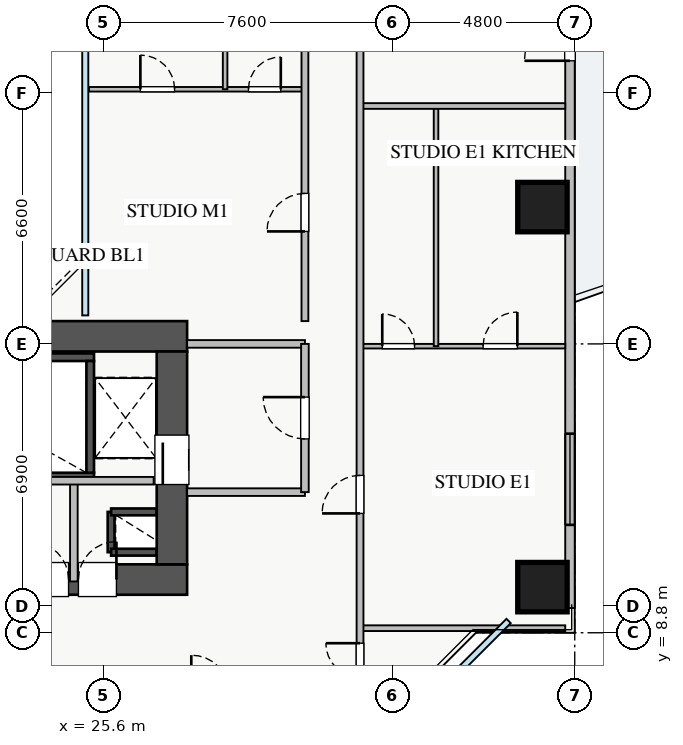
"""IFC4 building model, lengths in metres.
Left out: names, types, materials, properties, quantities, classifications, styles, units other than length and angle.
Written with IfcOpenShell. Run it as: python <this file> out.ifc"""

import sys

from ifc_helpers import new_model, si_unit, direction, frame, frame_2d, origin, origin_2d, place, context, subcontext, project, spatial, rectangle, extrude, source, transform, mapped, element, fill, save


model = new_model("IFC4")
c1 = context("Model", 3, precision=1e-05, world=origin(), true_north=direction((0.0, 1.0)))
c2 = subcontext(c1, "Body", "Model", "MODEL_VIEW")
j1 = project(units=[si_unit("LENGTHUNIT", "METRE"), si_unit("PLANEANGLEUNIT", "RADIAN")], contexts=[c1])
p1 = place(None, origin())
s1 = spatial("IfcSite", under=j1, at=p1, CompositionType="ELEMENT")
p2 = place(p1, origin())
s2 = spatial("IfcBuilding", under=s1, at=p2, CompositionType="ELEMENT")
p3 = place(p2, frame((0.0, 0.0, 86.0)))
s3 = spatial("IfcBuildingStorey", under=s2, at=p3, CompositionType="ELEMENT", Elevation=86.0)
p4 = place(p3, frame((25.8, 10.92, 0.0), z_axis=(0.0, 0.0, 1.0), x_axis=(0.0, 1.0, 0.0)))
e1 = element("IfcWall", 1, at=p4, inside=s3, PredefinedType="SHEAR", context=c2, shape_type="SweptSolid", body=[
    extrude(rectangle(XDim=1.06, YDim=0.18, at=frame_2d((0.53, 0.0))), origin(), (0.0, 0.0, 1.0), 3.07),
])
for number, where, z_axis, x_axis in (
    (2, (25.8, 11.98, 0.0), (0.0, 0.0, 1.0), (1.0, 0.0, 0.0)),
    (3, (25.8, 10.92, 0.0), (0.0, 0.0, 1.0), (1.0, 0.0, 0.0)),
):
    element("IfcWall", number, at=place(p3, frame(where, z_axis=z_axis, x_axis=x_axis)), inside=s3, PredefinedType="SHEAR", context=c2, shape_type="SweptSolid", body=[
        extrude(rectangle(XDim=1.2, YDim=0.18, at=frame_2d((0.6, 0.0))), origin(), (0.0, 0.0, 1.0), 3.07),
    ])
p5 = place(p3, frame((18.2, 12.91, 0.0), z_axis=(0.0, 0.0, 1.0), x_axis=(1.0, 0.0, 0.0)))
e4 = element("IfcWall", 4, at=p5, inside=s3, PredefinedType="SHEAR", context=c2, shape_type="SweptSolid", body=[
    extrude(rectangle(XDim=7.15, YDim=0.2, at=frame_2d((3.575, 0.0))), origin(), (0.0, 0.0, 1.0), 3.25),
])
p6 = place(p5, frame((0.35, 0.0, 0.0)))
e5 = element("IfcOpeningElement", 5, at=p6, cuts=e4, PredefinedType="OPENING", context=c2, shape_type="SweptSolid", body=[
    extrude(rectangle(XDim=1.1, YDim=2.05, at=frame_2d((0.55, 1.025))), frame((0.0, 0.11, 0.0), z_axis=(0.0, -1.0, 0.0), x_axis=(1.0, 0.0, 0.0)), (0.0, 0.0, 1.0), 0.22),
])
p7 = place(p3, frame((18.2, 16.05, 0.0), z_axis=(0.0, 0.0, 1.0), x_axis=(1.0, 0.0, 0.0)))
e6 = element("IfcWall", 6, at=p7, inside=s3, PredefinedType="SHEAR", context=c2, shape_type="SweptSolid", body=[
    extrude(rectangle(XDim=7.15, YDim=0.2, at=frame_2d((3.575, 0.0))), origin(), (0.0, 0.0, 1.0), 3.25),
])
p8 = place(p3, frame((25.25, 13.01, 0.0), z_axis=(0.0, 0.0, 1.0), x_axis=(0.0, 1.0, 0.0)))
e7 = element("IfcWall", 7, at=p8, inside=s3, PredefinedType="SHEAR", context=c2, shape_type="SweptSolid", body=[
    extrude(rectangle(XDim=2.94, YDim=0.2, at=frame_2d((1.47, 0.0))), origin(), (0.0, 0.0, 1.0), 3.25),
])
p9 = place(p3, frame((10.2, 10.2, 0.0), z_axis=(0.0, 0.0, 1.0), x_axis=(1.0, 0.0, 0.0)))
e8 = element("IfcWall", 8, at=p9, inside=s3, PredefinedType="SHEAR", context=c2, shape_type="SweptSolid", body=[
    extrude(rectangle(XDim=17.6, YDim=0.8, at=frame_2d((8.8, 0.0))), origin(), (0.0, 0.0, 1.0), 3.25),
])
p10 = place(p9, frame((1.15, 0.0, 0.0)))
e9 = element("IfcOpeningElement", 9, at=p10, cuts=e8, PredefinedType="OPENING", context=c2, shape_type="SweptSolid", body=[
    extrude(rectangle(XDim=1.1, YDim=2.05, at=frame_2d((0.55, 1.025))), frame((0.0, 0.41, 0.0), z_axis=(0.0, -1.0, 0.0), x_axis=(1.0, 0.0, 0.0)), (0.0, 0.0, 1.0), 0.82),
])
p11 = place(p9, frame((8.3, 0.0, 0.0)))
e10 = element("IfcOpeningElement", 10, at=p11, cuts=e8, PredefinedType="OPENING", context=c2, shape_type="SweptSolid", body=[
    extrude(rectangle(XDim=1.1, YDim=2.05, at=frame_2d((0.55, 1.025))), frame((0.0, 0.41, 0.0), z_axis=(0.0, -1.0, 0.0), x_axis=(1.0, 0.0, 0.0)), (0.0, 0.0, 1.0), 0.82),
])
p12 = place(p9, frame((10.05, 0.0, 0.0)))
e11 = element("IfcOpeningElement", 11, at=p12, cuts=e8, PredefinedType="OPENING", context=c2, shape_type="SweptSolid", body=[
    extrude(rectangle(XDim=1.1, YDim=2.05, at=frame_2d((0.55, 1.025))), frame((0.0, 0.41, 0.0), z_axis=(0.0, -1.0, 0.0), x_axis=(1.0, 0.0, 0.0)), (0.0, 0.0, 1.0), 0.82),
])
p13 = place(p9, frame((14.74, 0.0, 0.0)))
e12 = element("IfcOpeningElement", 12, at=p13, cuts=e8, PredefinedType="OPENING", context=c2, shape_type="SweptSolid", body=[
    extrude(rectangle(XDim=1.0, YDim=2.05, at=frame_2d((0.5, 1.025))), frame((0.0, 0.41, 0.0), z_axis=(0.0, -1.0, 0.0), x_axis=(1.0, 0.0, 0.0)), (0.0, 0.0, 1.0), 0.82),
])
p14 = place(p9, frame((11.945, 0.0, 0.0)))
e13 = element("IfcOpeningElement", 13, at=p14, cuts=e8, PredefinedType="OPENING", context=c2, shape_type="SweptSolid", body=[
    extrude(rectangle(XDim=1.0, YDim=2.05, at=frame_2d((0.5, 1.025))), frame((0.0, 0.41, 0.0), z_axis=(0.0, -1.0, 0.0), x_axis=(1.0, 0.0, 0.0)), (0.0, 0.0, 1.0), 0.82),
])
p15 = place(p9, frame((13.48, 0.0, 0.0)))
e14 = element("IfcOpeningElement", 14, at=p15, cuts=e8, PredefinedType="OPENING", context=c2, shape_type="SweptSolid", body=[
    extrude(rectangle(XDim=1.0, YDim=2.05, at=frame_2d((0.5, 1.025))), frame((0.0, 0.41, 0.0), z_axis=(0.0, -1.0, 0.0), x_axis=(1.0, 0.0, 0.0)), (0.0, 0.0, 1.0), 0.82),
])
p16 = place(p3, frame((10.2, 16.6, 0.0), z_axis=(0.0, 0.0, 1.0), x_axis=(1.0, 0.0, 0.0)))
e15 = element("IfcWall", 15, at=p16, inside=s3, PredefinedType="SHEAR", context=c2, shape_type="SweptSolid", body=[
    extrude(rectangle(XDim=17.6, YDim=0.8, at=frame_2d((8.8, 0.0))), origin(), (0.0, 0.0, 1.0), 3.25),
])
p17 = place(p3, frame((27.4, 10.6, 0.0), z_axis=(0.0, 0.0, 1.0), x_axis=(0.0, 1.0, 0.0)))
e16 = element("IfcWall", 16, at=p17, inside=s3, PredefinedType="SHEAR", context=c2, shape_type="SweptSolid", body=[
    extrude(rectangle(XDim=5.6, YDim=0.8, at=frame_2d((2.8, 0.0))), origin(), (0.0, 0.0, 1.0), 3.25),
])
p18 = place(p17, frame((2.1, 0.0, 0.0)))
e17 = element("IfcOpeningElement", 17, at=p18, cuts=e16, PredefinedType="OPENING", context=c2, shape_type="SweptSolid", body=[
    extrude(rectangle(XDim=1.3, YDim=2.05, at=frame_2d((0.65, 1.025))), frame((0.0, 0.41, 0.0), z_axis=(0.0, -1.0, 0.0), x_axis=(1.0, 0.0, 0.0)), (0.0, 0.0, 1.0), 0.82),
])
m1 = source(origin(), c2, "Body", "SweptSolid", [
    extrude(rectangle(XDim=1.3, YDim=1.3, at=origin_2d()), origin(), (0.0, 0.0, 1.0), 3.25),
])
for number, where, z_axis, x_axis in (
    (18, (37.15, 10.0, 0.0), (0.0, 0.0, 1.0), (1.0, 0.0, 0.0)),
    (19, (37.15, 20.0, 0.0), (0.0, 0.0, 1.0), (1.0, 0.0, 0.0)),
):
    element("IfcColumn", number, at=place(p3, frame(where, z_axis=z_axis, x_axis=x_axis)), inside=s3, PredefinedType="COLUMN", context=c2, shape_type="MappedRepresentation", body=[
        mapped(m1, transform((0.0, 0.0, 0.0), x_axis=(1.0, 0.0, 0.0), y_axis=(0.0, 1.0, 0.0), z_axis=(0.0, 0.0, 1.0), scale=1.0)),
    ])
p19 = place(p3, frame((37.875, 9.45, 0.0), z_axis=(0.0, 0.0, 1.0), x_axis=(0.0, 1.0, 0.0)))
e20 = element("IfcWall", 20, at=p19, inside=s3, PredefinedType="STANDARD", context=c2, shape_type="SweptSolid", body=[
    extrude(rectangle(XDim=27.1, YDim=0.25, at=frame_2d((13.55, 0.0))), origin(), (0.0, 0.0, 1.0), 2.61),
])
p20 = place(p19, frame((14.4, 0.0, 0.0)))
e21 = element("IfcOpeningElement", 21, at=p20, cuts=e20, PredefinedType="OPENING", context=c2, shape_type="SweptSolid", body=[
    extrude(rectangle(XDim=1.2, YDim=2.1, at=frame_2d((0.6, 1.05))), frame((0.0, 0.135, 0.0), z_axis=(0.0, -1.0, 0.0), x_axis=(1.0, 0.0, 0.0)), (0.0, 0.0, 1.0), 0.27),
])
p21 = place(p19, frame((2.188, 0.0, 0.9)))
e22 = element("IfcOpeningElement", 22, at=p21, cuts=e20, PredefinedType="OPENING", context=c2, shape_type="SweptSolid", body=[
    extrude(rectangle(XDim=2.4, YDim=1.48, at=frame_2d((1.2, 0.74))), frame((0.0, 0.135, 0.0), z_axis=(0.0, -1.0, 0.0), x_axis=(1.0, 0.0, 0.0)), (0.0, 0.0, 1.0), 0.27),
])
p22 = place(p19, frame((22.663, 0.0, 0.9)))
e23 = element("IfcOpeningElement", 23, at=p22, cuts=e20, PredefinedType="OPENING", context=c2, shape_type="SweptSolid", body=[
    extrude(rectangle(XDim=2.1, YDim=1.48, at=frame_2d((1.05, 0.74))), frame((0.0, 0.135, 0.0), z_axis=(0.0, -1.0, 0.0), x_axis=(1.0, 0.0, 0.0)), (0.0, 0.0, 1.0), 0.27),
])
p23 = place(p19, frame((17.365, 0.0, 0.9)))
e24 = element("IfcOpeningElement", 24, at=p23, cuts=e20, PredefinedType="OPENING", context=c2, shape_type="SweptSolid", body=[
    extrude(rectangle(XDim=0.9, YDim=1.2, at=frame_2d((0.45, 0.6))), frame((0.0, 0.135, 0.0), z_axis=(0.0, -1.0, 0.0), x_axis=(1.0, 0.0, 0.0)), (0.0, 0.0, 1.0), 0.27),
])
for number, where, z_axis, x_axis in (
    (25, (27.8, 16.4, 0.0), (0.0, 0.0, 1.0), (1.0, 0.0, 0.0)),
    (26, (27.8, 12.5, 0.0), (0.0, 0.0, 1.0), (1.0, 0.0, 0.0)),
):
    element("IfcWall", number, at=place(p3, frame(where, z_axis=z_axis, x_axis=x_axis)), inside=s3, PredefinedType="PARTITIONING", context=c2, shape_type="SweptSolid", body=[
        extrude(rectangle(XDim=3.1, YDim=0.2, at=frame_2d((1.55, 0.0))), origin(), (0.0, 0.0, 1.0), 3.07),
    ])
p24 = place(p3, frame((30.9, 12.5, 0.0), z_axis=(0.0, 0.0, 1.0), x_axis=(0.0, 1.0, 0.0)))
e27 = element("IfcWall", 27, at=p24, inside=s3, PredefinedType="PARTITIONING", context=c2, shape_type="SweptSolid", body=[
    extrude(rectangle(XDim=3.9, YDim=0.2, at=frame_2d((1.95, 0.0))), origin(), (0.0, 0.0, 1.0), 3.07),
])
p25 = place(p24, frame((1.4, 0.0, 0.0)))
e28 = element("IfcOpeningElement", 28, at=p25, cuts=e27, PredefinedType="OPENING", context=c2, shape_type="SweptSolid", body=[
    extrude(rectangle(XDim=1.1, YDim=2.05, at=frame_2d((0.55, 1.025))), frame((0.0, 0.11, 0.0), z_axis=(0.0, -1.0, 0.0), x_axis=(1.0, 0.0, 0.0)), (0.0, 0.0, 1.0), 0.22),
])
p26 = place(p3, frame((24.82, 10.15, 0.0), z_axis=(0.0, 0.0, 1.0), x_axis=(0.0, 1.0, 0.0)))
e29 = element("IfcWall", 29, at=p26, inside=s3, PredefinedType="PARTITIONING", context=c2, shape_type="SweptSolid", body=[
    extrude(rectangle(XDim=2.65, YDim=0.2, at=frame_2d((1.325, 0.0))), origin(), (0.0, 0.0, 1.0), 3.07),
])
p27 = place(p3, frame((21.75, 12.8, 0.0), z_axis=(0.0, 0.0, 1.0), x_axis=(1.0, 0.0, 0.0)))
e30 = element("IfcWall", 30, at=p27, inside=s3, PredefinedType="PARTITIONING", context=c2, shape_type="SweptSolid", body=[
    extrude(rectangle(XDim=5.17, YDim=0.2, at=frame_2d((2.585, 0.0))), origin(), (0.0, 0.0, 1.0), 3.07),
])
p28 = place(p3, frame((32.35, 8.92, 0.0), z_axis=(0.0, 0.0, 1.0), x_axis=(1.0, 0.0, 0.0)))
e31 = element("IfcWall", 31, at=p28, inside=s3, PredefinedType="PARTITIONING", context=c2, shape_type="SweptSolid", body=[
    extrude(rectangle(XDim=5.4, YDim=0.15, at=frame_2d((2.7, 0.0))), origin(), (0.0, 0.0, 1.0), 3.07),
])
p29 = place(p3, frame((32.35, 16.34, 0.0), z_axis=(0.0, 0.0, 1.0), x_axis=(1.0, 0.0, 0.0)))
e32 = element("IfcWall", 32, at=p29, inside=s3, PredefinedType="PLUMBINGWALL", context=c2, shape_type="SweptSolid", body=[
    extrude(rectangle(XDim=5.4, YDim=0.12, at=frame_2d((2.7, 0.0))), origin(), (0.0, 0.0, 1.0), 3.07),
])
p30 = place(p29, frame((0.585, 0.0, 0.0)))
e33 = element("IfcOpeningElement", 33, at=p30, cuts=e32, PredefinedType="OPENING", context=c2, shape_type="SweptSolid", body=[
    extrude(rectangle(XDim=0.85, YDim=2.05, at=frame_2d((0.425, 1.025))), frame((0.0, 0.07, 0.0), z_axis=(0.0, -1.0, 0.0), x_axis=(1.0, 0.0, 0.0)), (0.0, 0.0, 1.0), 0.14),
])
p31 = place(p29, frame((3.24, 0.0, 0.0)))
e34 = element("IfcOpeningElement", 34, at=p31, cuts=e32, PredefinedType="OPENING", context=c2, shape_type="SweptSolid", body=[
    extrude(rectangle(XDim=0.9, YDim=2.05, at=frame_2d((0.45, 1.025))), frame((0.0, 0.07, 0.0), z_axis=(0.0, -1.0, 0.0), x_axis=(1.0, 0.0, 0.0)), (0.0, 0.0, 1.0), 0.14),
])
p32 = place(p3, frame((34.35, 16.34, 0.0), z_axis=(0.0, 0.0, 1.0), x_axis=(0.0, 1.0, 0.0)))
e35 = element("IfcWall", 35, at=p32, inside=s3, PredefinedType="PLUMBINGWALL", context=c2, shape_type="SweptSolid", body=[
    extrude(rectangle(XDim=6.32, YDim=0.12, at=frame_2d((3.16, 0.0))), origin(), (0.0, 0.0, 1.0), 3.07),
])
p33 = place(p3, frame((32.35, 22.66, 0.0), z_axis=(0.0, 0.0, 1.0), x_axis=(1.0, 0.0, 0.0)))
e36 = element("IfcWall", 36, at=p33, inside=s3, PredefinedType="PARTITIONING", context=c2, shape_type="SweptSolid", body=[
    extrude(rectangle(XDim=5.4, YDim=0.15, at=frame_2d((2.7, 0.0))), origin(), (0.0, 0.0, 1.0), 3.07),
])
p34 = place(p3, frame((32.35, 7.21, 0.0), z_axis=(0.0, 0.0, 1.0), x_axis=(0.0, 1.0, 0.0)))
e37 = element("IfcWall", 37, at=p34, inside=s3, PredefinedType="PARTITIONING", context=c2, shape_type="SweptSolid", body=[
    extrude(rectangle(XDim=31.23, YDim=0.18, at=frame_2d((15.615, 0.0))), origin(), (0.0, 0.0, 1.0), 2.715),
])
p35 = place(p34, frame((30.09, 0.0, 0.0)))
e38 = element("IfcOpeningElement", 38, at=p35, cuts=e37, PredefinedType="OPENING", context=c2, shape_type="SweptSolid", body=[
    extrude(rectangle(XDim=0.9, YDim=2.05, at=frame_2d((0.45, 1.025))), frame((0.0, 0.1, 0.0), z_axis=(0.0, -1.0, 0.0), x_axis=(1.0, 0.0, 0.0)), (0.0, 0.0, 1.0), 0.2),
])
p36 = place(p34, frame((0.415, 0.0, 0.0)))
e39 = element("IfcOpeningElement", 39, at=p36, cuts=e37, PredefinedType="OPENING", context=c2, shape_type="SweptSolid", body=[
    extrude(rectangle(XDim=0.9, YDim=2.05, at=frame_2d((0.45, 1.025))), frame((0.0, 0.1, 0.0), z_axis=(0.0, -1.0, 0.0), x_axis=(1.0, 0.0, 0.0)), (0.0, 0.0, 1.0), 0.2),
])
p37 = place(p34, frame((4.73, 0.0, 0.0)))
e40 = element("IfcOpeningElement", 40, at=p37, cuts=e37, PredefinedType="OPENING", context=c2, shape_type="SweptSolid", body=[
    extrude(rectangle(XDim=1.0, YDim=2.05, at=frame_2d((0.5, 1.025))), frame((0.0, 0.1, 0.0), z_axis=(0.0, -1.0, 0.0), x_axis=(1.0, 0.0, 0.0)), (0.0, 0.0, 1.0), 0.2),
])
p38 = place(p34, frame((18.655, 0.0, 0.0)))
e41 = element("IfcOpeningElement", 41, at=p38, cuts=e37, PredefinedType="OPENING", context=c2, shape_type="SweptSolid", body=[
    extrude(rectangle(XDim=1.0, YDim=2.05, at=frame_2d((0.5, 1.025))), frame((0.0, 0.1, 0.0), z_axis=(0.0, -1.0, 0.0), x_axis=(1.0, 0.0, 0.0)), (0.0, 0.0, 1.0), 0.2),
])
p39 = place(p3, frame((25.22, 23.1, 0.0), z_axis=(0.0, 0.0, 1.0), x_axis=(1.0, 0.0, 0.0)))
e42 = element("IfcWall", 42, at=p39, inside=s3, PredefinedType="PLUMBINGWALL", context=c2, shape_type="SweptSolid", body=[
    extrude(rectangle(XDim=5.68, YDim=0.12, at=frame_2d((2.84, 0.0))), origin(), (0.0, 0.0, 1.0), 3.07),
])
p40 = place(p39, frame((1.35, 0.0, 0.0)))
e43 = element("IfcOpeningElement", 43, at=p40, cuts=e42, PredefinedType="OPENING", context=c2, shape_type="SweptSolid", body=[
    extrude(rectangle(XDim=0.9, YDim=2.05, at=frame_2d((0.45, 1.025))), frame((0.0, 0.07, 0.0), z_axis=(0.0, -1.0, 0.0), x_axis=(1.0, 0.0, 0.0)), (0.0, 0.0, 1.0), 0.14),
])
p41 = place(p39, frame((4.195, 0.0, 0.0)))
e44 = element("IfcOpeningElement", 44, at=p41, cuts=e42, PredefinedType="OPENING", context=c2, shape_type="SweptSolid", body=[
    extrude(rectangle(XDim=0.85, YDim=2.05, at=frame_2d((0.425, 1.025))), frame((0.0, 0.07, 0.0), z_axis=(0.0, -1.0, 0.0), x_axis=(1.0, 0.0, 0.0)), (0.0, 0.0, 1.0), 0.14),
])
p42 = place(p3, frame((28.8, 23.1, 0.0), z_axis=(0.0, 0.0, 1.0), x_axis=(0.0, 1.0, 0.0)))
e45 = element("IfcWall", 45, at=p42, inside=s3, PredefinedType="PLUMBINGWALL", context=c2, shape_type="SweptSolid", body=[
    extrude(rectangle(XDim=5.9, YDim=0.12, at=frame_2d((2.95, 0.0))), origin(), (0.0, 0.0, 1.0), 3.07),
])
p43 = place(p3, frame((30.9, 17.0, 0.0), z_axis=(0.0, 0.0, 1.0), x_axis=(0.0, 1.0, 0.0)))
e46 = element("IfcWall", 46, at=p43, inside=s3, PredefinedType="PARTITIONING", context=c2, shape_type="SweptSolid", body=[
    extrude(rectangle(XDim=12.0, YDim=0.18, at=frame_2d((6.0, 0.0))), origin(), (0.0, 0.0, 1.0), 3.07),
])
p44 = place(p43, frame((2.36, 0.0, 0.0)))
e47 = element("IfcOpeningElement", 47, at=p44, cuts=e46, PredefinedType="OPENING", context=c2, shape_type="SweptSolid", body=[
    extrude(rectangle(XDim=1.0, YDim=2.05, at=frame_2d((0.5, 1.025))), frame((0.0, 0.1, 0.0), z_axis=(0.0, -1.0, 0.0), x_axis=(1.0, 0.0, 0.0)), (0.0, 0.0, 1.0), 0.2),
])
m2 = source(origin(), c2, "Body", "SweptSolid", [
    extrude(rectangle(XDim=1.2, YDim=2.1, at=frame_2d((0.6, 1.05))), frame((0.0, 0.025, 0.0), z_axis=(0.0, -1.0, 0.0), x_axis=(1.0, 0.0, 0.0)), (0.0, 0.0, 1.0), 0.05),
])
p45 = place(p20, origin())
e48 = element("IfcDoor", 48, at=p45, inside=s3, OperationType="SINGLE_SWING_LEFT", PredefinedType="DOOR", context=c2, shape_type="MappedRepresentation", body=[
    mapped(m2, transform((0.0, 0.0, 0.0), x_axis=(1.0, 0.0, 0.0), y_axis=(0.0, 1.0, 0.0), z_axis=(0.0, 0.0, 1.0), scale=1.0)),
])
fill(e21, e48)
m3 = source(origin(), c2, "Body", "SweptSolid", [
    extrude(rectangle(XDim=2.4, YDim=1.48, at=frame_2d((1.2, 0.74))), frame((0.0, 0.03, 0.0), z_axis=(0.0, -1.0, 0.0), x_axis=(1.0, 0.0, 0.0)), (0.0, 0.0, 1.0), 0.06),
])
p46 = place(p21, origin())
e49 = element("IfcWindow", 49, at=p46, inside=s3, PartitioningType="TRIPLE_PANEL_VERTICAL", PredefinedType="WINDOW", context=c2, shape_type="MappedRepresentation", body=[
    mapped(m3, transform((0.0, 0.0, 0.0), x_axis=(1.0, 0.0, 0.0), y_axis=(0.0, 1.0, 0.0), z_axis=(0.0, 0.0, 1.0), scale=1.0)),
])
fill(e22, e49)
m4 = source(origin(), c2, "Body", "SweptSolid", [
    extrude(rectangle(XDim=1.3, YDim=2.05, at=frame_2d((0.65, 1.025))), frame((0.0, 0.025, 0.0), z_axis=(0.0, -1.0, 0.0), x_axis=(1.0, 0.0, 0.0)), (0.0, 0.0, 1.0), 0.05),
])
p47 = place(p18, origin())
e50 = element("IfcDoor", 50, at=p47, inside=s3, OperationType="SLIDING_TO_RIGHT", PredefinedType="DOOR", context=c2, shape_type="MappedRepresentation", body=[
    mapped(m4, transform((0.0, 0.0, 0.0), x_axis=(1.0, 0.0, 0.0), y_axis=(0.0, 1.0, 0.0), z_axis=(0.0, 0.0, 1.0), scale=1.0)),
])
fill(e17, e50)
m5 = source(origin(), c2, "Body", "SweptSolid", [
    extrude(rectangle(XDim=1.0, YDim=2.05, at=frame_2d((0.5, 1.025))), frame((0.0, 0.025, 0.0), z_axis=(0.0, -1.0, 0.0), x_axis=(1.0, 0.0, 0.0)), (0.0, 0.0, 1.0), 0.05),
])
p48 = place(p13, origin())
e51 = element("IfcDoor", 51, at=p48, inside=s3, OperationType="SINGLE_SWING_RIGHT", PredefinedType="DOOR", context=c2, shape_type="MappedRepresentation", body=[
    mapped(m5, transform((0.0, 0.0, 0.0), x_axis=(1.0, 0.0, 0.0), y_axis=(0.0, 1.0, 0.0), z_axis=(0.0, 0.0, 1.0), scale=1.0)),
])
fill(e12, e51)
p49 = place(p15, origin())
e52 = element("IfcDoor", 52, at=p49, inside=s3, OperationType="SINGLE_SWING_LEFT", PredefinedType="DOOR", context=c2, shape_type="MappedRepresentation", body=[
    mapped(m5, transform((0.0, 0.0, 0.0), x_axis=(1.0, 0.0, 0.0), y_axis=(0.0, 1.0, 0.0), z_axis=(0.0, 0.0, 1.0), scale=1.0)),
])
fill(e14, e52)
m6 = source(origin(), c2, "Body", "SweptSolid", [
    extrude(rectangle(XDim=1.1, YDim=2.05, at=frame_2d((0.55, 1.025))), frame((0.0, 0.025, 0.0), z_axis=(0.0, -1.0, 0.0), x_axis=(1.0, 0.0, 0.0)), (0.0, 0.0, 1.0), 0.05),
])
p50 = place(p25, origin())
e53 = element("IfcDoor", 53, at=p50, inside=s3, OperationType="SINGLE_SWING_RIGHT", PredefinedType="DOOR", context=c2, shape_type="MappedRepresentation", body=[
    mapped(m6, transform((0.0, 0.0, 0.0), x_axis=(1.0, 0.0, 0.0), y_axis=(0.0, 1.0, 0.0), z_axis=(0.0, 0.0, 1.0), scale=1.0)),
])
fill(e28, e53)
m7 = source(origin(), c2, "Body", "SweptSolid", [
    extrude(rectangle(XDim=0.85, YDim=2.05, at=frame_2d((0.425, 1.025))), frame((0.0, 0.025, 0.0), z_axis=(0.0, -1.0, 0.0), x_axis=(1.0, 0.0, 0.0)), (0.0, 0.0, 1.0), 0.05),
])
p51 = place(p30, origin())
e54 = element("IfcDoor", 54, at=p51, inside=s3, OperationType="SINGLE_SWING_LEFT", PredefinedType="DOOR", context=c2, shape_type="MappedRepresentation", body=[
    mapped(m7, transform((0.0, 0.0, 0.0), x_axis=(1.0, 0.0, 0.0), y_axis=(0.0, 1.0, 0.0), z_axis=(0.0, 0.0, 1.0), scale=1.0)),
])
fill(e33, e54)
m8 = source(origin(), c2, "Body", "SweptSolid", [
    extrude(rectangle(XDim=0.9, YDim=2.05, at=frame_2d((0.45, 1.025))), frame((0.0, 0.025, 0.0), z_axis=(0.0, -1.0, 0.0), x_axis=(1.0, 0.0, 0.0)), (0.0, 0.0, 1.0), 0.05),
])
p52 = place(p31, origin())
e55 = element("IfcDoor", 55, at=p52, inside=s3, OperationType="SINGLE_SWING_RIGHT", PredefinedType="DOOR", context=c2, shape_type="MappedRepresentation", body=[
    mapped(m8, transform((0.0, 0.0, 0.0), x_axis=(1.0, 0.0, 0.0), y_axis=(0.0, 1.0, 0.0), z_axis=(0.0, 0.0, 1.0), scale=1.0)),
])
fill(e34, e55)
p53 = place(p36, origin())
e56 = element("IfcDoor", 56, at=p53, inside=s3, OperationType="SINGLE_SWING_RIGHT", PredefinedType="DOOR", context=c2, shape_type="MappedRepresentation", body=[
    mapped(m8, transform((0.0, 0.0, 0.0), x_axis=(1.0, 0.0, 0.0), y_axis=(0.0, 1.0, 0.0), z_axis=(0.0, 0.0, 1.0), scale=1.0)),
])
fill(e39, e56)
p54 = place(p37, origin())
e57 = element("IfcDoor", 57, at=p54, inside=s3, OperationType="SINGLE_SWING_LEFT", PredefinedType="DOOR", context=c2, shape_type="MappedRepresentation", body=[
    mapped(m5, transform((0.0, 0.0, 0.0), x_axis=(1.0, 0.0, 0.0), y_axis=(0.0, 1.0, 0.0), z_axis=(0.0, 0.0, 1.0), scale=1.0)),
])
fill(e40, e57)
p55 = place(p40, origin())
e58 = element("IfcDoor", 58, at=p55, inside=s3, OperationType="SINGLE_SWING_LEFT", PredefinedType="DOOR", context=c2, shape_type="MappedRepresentation", body=[
    mapped(m8, transform((0.0, 0.0, 0.0), x_axis=(1.0, 0.0, 0.0), y_axis=(0.0, 1.0, 0.0), z_axis=(0.0, 0.0, 1.0), scale=1.0)),
])
fill(e43, e58)
p56 = place(p41, origin())
e59 = element("IfcDoor", 59, at=p56, inside=s3, OperationType="SINGLE_SWING_RIGHT", PredefinedType="DOOR", context=c2, shape_type="MappedRepresentation", body=[
    mapped(m7, transform((0.0, 0.0, 0.0), x_axis=(1.0, 0.0, 0.0), y_axis=(0.0, 1.0, 0.0), z_axis=(0.0, 0.0, 1.0), scale=1.0)),
])
fill(e44, e59)
p57 = place(p44, origin())
e60 = element("IfcDoor", 60, at=p57, inside=s3, OperationType="SINGLE_SWING_LEFT", PredefinedType="DOOR", context=c2, shape_type="MappedRepresentation", body=[
    mapped(m5, transform((0.0, 0.0, 0.0), x_axis=(1.0, 0.0, 0.0), y_axis=(0.0, 1.0, 0.0), z_axis=(0.0, 0.0, 1.0), scale=1.0)),
])
fill(e47, e60)
save(model, sys.argv[1])
